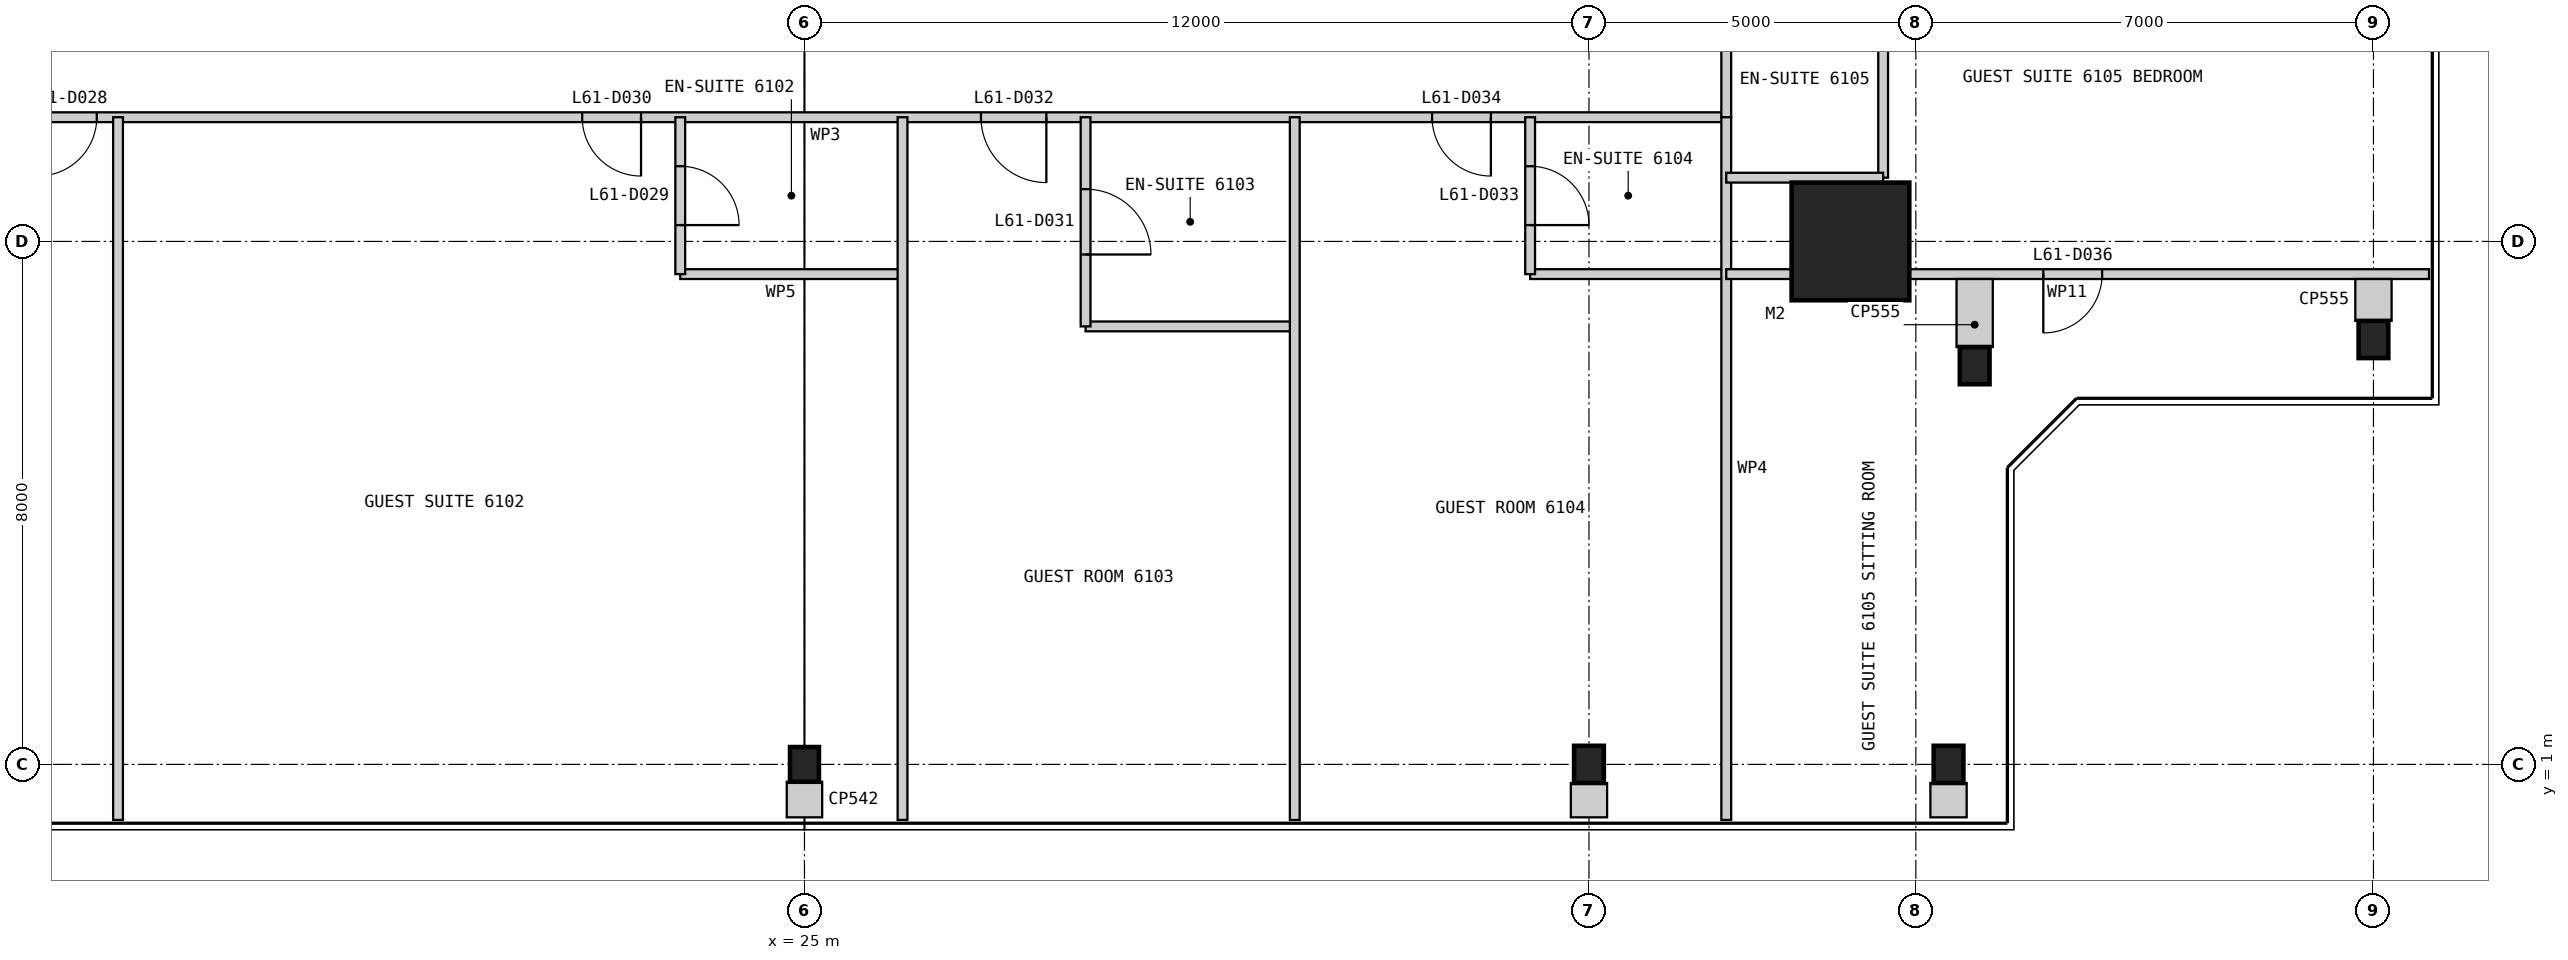
"""IFC4 building model, lengths in metres.
Left out: names, types, materials, properties, quantities, classifications, styles, units other than length and angle.
Written with IfcOpenShell. Run it as: python <this file> out.ifc"""

import sys

from ifc_helpers import new_model, si_unit, direction, frame, frame_2d, origin, origin_2d, place, context, subcontext, project, spatial, rectangle, i_section, extrude, element, fill, save


model = new_model("IFC4")
c1 = context("Model", 3, precision=1e-05, world=origin(), true_north=direction((0.0, 1.0)))
c2 = subcontext(c1, "Body", "Model", "MODEL_VIEW")
j1 = project(units=[si_unit("LENGTHUNIT", "METRE"), si_unit("PLANEANGLEUNIT", "RADIAN")], contexts=[c1])
p1 = place(None, origin())
s1 = spatial("IfcSite", under=j1, at=p1, CompositionType="ELEMENT")
p2 = place(p1, origin())
s2 = spatial("IfcBuilding", under=s1, at=p2, CompositionType="ELEMENT")
p3 = place(p2, frame((0.0, 0.0, 259.4)))
s3 = spatial("IfcBuildingStorey", under=s2, at=p3, CompositionType="ELEMENT", Elevation=259.4)
p4 = place(p3, frame((41.0, 9.0, 0.0), z_axis=(0.0, 0.0, 1.0), x_axis=(1.0, 0.0, 0.0)))
e1 = element("IfcColumn", 1, at=p4, inside=s3, PredefinedType="COLUMN", context=c2, shape_type="SweptSolid", body=[
    extrude(rectangle(XDim=1.8, YDim=1.8, at=origin_2d()), origin(), (0.0, 0.0, 1.0), 3.4),
])
p5 = place(p3, frame((25.0, 1.0, 0.0), z_axis=(0.0, 0.0, 1.0), x_axis=(1.0, 0.0, 0.0)))
e2 = element("IfcColumn", 2, at=p5, inside=s3, PredefinedType="COLUMN", context=c2, shape_type="SweptSolid", body=[
    extrude(i_section(OverallWidth=0.442, OverallDepth=0.531, WebThickness=0.066, FlangeThickness=0.106, at=origin_2d()), origin(), (0.0, 0.0, 1.0), 3.4),
])
for number, where, z_axis, x_axis in (
    (3, (37.0, 1.0, 0.0), (0.0, 0.0, 1.0), (1.0, 0.0, 0.0)),
    (4, (42.5, 1.0, 0.0), (0.0, 0.0, 1.0), (1.0, 0.0, 0.0)),
    (5, (42.9, 7.1, 0.0), (0.0, 0.0, 1.0), (1.0, 0.0, 0.0)),
    (6, (49.0, 7.5, 0.0), (0.0, 0.0, 1.0), (1.0, 0.0, 0.0)),
):
    element("IfcColumn", number, at=place(p3, frame(where, z_axis=z_axis, x_axis=x_axis)), inside=s3, PredefinedType="COLUMN", context=c2, shape_type="SweptSolid", body=[
        extrude(i_section(OverallWidth=0.455, OverallDepth=0.569, WebThickness=0.078, FlangeThickness=0.125, at=origin_2d()), origin(), (0.0, 0.0, 1.0), 3.4),
    ])
p6 = place(p3, frame((10.9, 10.9, 0.0), z_axis=(0.0, 0.0, 1.0), x_axis=(1.0, 0.0, 0.0)))
e7 = element("IfcWall", 7, at=p6, inside=s3, PredefinedType="PARTITIONING", context=c2, shape_type="SweptSolid", body=[
    extrude(rectangle(XDim=28.2, YDim=0.15, at=frame_2d((14.1, 0.0))), origin(), (0.0, 0.0, 1.0), 3.25),
])
p7 = place(p6, frame((2.375, 0.0, 0.0)))
e8 = element("IfcOpeningElement", 8, at=p7, cuts=e7, PredefinedType="OPENING", context=c2, shape_type="SweptSolid", body=[
    extrude(rectangle(XDim=0.9, YDim=2.1, at=frame_2d((0.45, 1.05))), frame((0.0, 0.085, 0.0), z_axis=(0.0, -1.0, 0.0), x_axis=(1.0, 0.0, 0.0)), (0.0, 0.0, 1.0), 0.17),
])
p8 = place(p6, frame((10.7, 0.0, 0.0)))
e9 = element("IfcOpeningElement", 9, at=p8, cuts=e7, PredefinedType="OPENING", context=c2, shape_type="SweptSolid", body=[
    extrude(rectangle(XDim=0.9, YDim=2.1, at=frame_2d((0.45, 1.05))), frame((0.0, 0.085, 0.0), z_axis=(0.0, -1.0, 0.0), x_axis=(1.0, 0.0, 0.0)), (0.0, 0.0, 1.0), 0.17),
])
p9 = place(p6, frame((16.8, 0.0, 0.0)))
e10 = element("IfcOpeningElement", 10, at=p9, cuts=e7, PredefinedType="OPENING", context=c2, shape_type="SweptSolid", body=[
    extrude(rectangle(XDim=1.0, YDim=2.1, at=frame_2d((0.5, 1.05))), frame((0.0, 0.085, 0.0), z_axis=(0.0, -1.0, 0.0), x_axis=(1.0, 0.0, 0.0)), (0.0, 0.0, 1.0), 0.17),
])
p10 = place(p6, frame((23.7, 0.0, 0.0)))
e11 = element("IfcOpeningElement", 11, at=p10, cuts=e7, PredefinedType="OPENING", context=c2, shape_type="SweptSolid", body=[
    extrude(rectangle(XDim=0.9, YDim=2.1, at=frame_2d((0.45, 1.05))), frame((0.0, 0.085, 0.0), z_axis=(0.0, -1.0, 0.0), x_axis=(1.0, 0.0, 0.0)), (0.0, 0.0, 1.0), 0.17),
])
p11 = place(p3, frame((14.5, 0.15, 0.0), z_axis=(0.0, 0.0, 1.0), x_axis=(0.0, 1.0, 0.0)))
e12 = element("IfcWall", 12, at=p11, inside=s3, PredefinedType="PARTITIONING", context=c2, shape_type="SweptSolid", body=[
    extrude(rectangle(XDim=10.75, YDim=0.15, at=frame_2d((5.375, 0.0))), origin(), (0.0, 0.0, 1.0), 3.25),
])
p12 = place(p3, frame((23.1, 8.5, 0.0), z_axis=(0.0, 0.0, 1.0), x_axis=(1.0, 0.0, 0.0)))
e13 = element("IfcWall", 13, at=p12, inside=s3, PredefinedType="PARTITIONING", context=c2, shape_type="SweptSolid", body=[
    extrude(rectangle(XDim=3.4, YDim=0.15, at=frame_2d((1.7, 0.0))), origin(), (0.0, 0.0, 1.0), 3.25),
])
p13 = place(p3, frame((23.1, 8.5, 0.0), z_axis=(0.0, 0.0, 1.0), x_axis=(0.0, 1.0, 0.0)))
e14 = element("IfcWall", 14, at=p13, inside=s3, PredefinedType="PARTITIONING", context=c2, shape_type="SweptSolid", body=[
    extrude(rectangle(XDim=2.4, YDim=0.15, at=frame_2d((1.2, 0.0))), origin(), (0.0, 0.0, 1.0), 3.25),
])
p14 = place(p13, frame((0.75, 0.0, 0.0)))
e15 = element("IfcOpeningElement", 15, at=p14, cuts=e14, PredefinedType="OPENING", context=c2, shape_type="SweptSolid", body=[
    extrude(rectangle(XDim=0.9, YDim=2.1, at=frame_2d((0.45, 1.05))), frame((0.0, 0.085, 0.0), z_axis=(0.0, -1.0, 0.0), x_axis=(1.0, 0.0, 0.0)), (0.0, 0.0, 1.0), 0.17),
])
p15 = place(p3, frame((26.5, 0.15, 0.0), z_axis=(0.0, 0.0, 1.0), x_axis=(0.0, 1.0, 0.0)))
e16 = element("IfcWall", 16, at=p15, inside=s3, PredefinedType="PARTITIONING", context=c2, shape_type="SweptSolid", body=[
    extrude(rectangle(XDim=10.75, YDim=0.15, at=frame_2d((5.375, 0.0))), origin(), (0.0, 0.0, 1.0), 3.25),
])
p16 = place(p3, frame((29.3, 7.7, 0.0), z_axis=(0.0, 0.0, 1.0), x_axis=(1.0, 0.0, 0.0)))
e17 = element("IfcWall", 17, at=p16, inside=s3, PredefinedType="PARTITIONING", context=c2, shape_type="SweptSolid", body=[
    extrude(rectangle(XDim=3.2, YDim=0.15, at=frame_2d((1.6, 0.0))), origin(), (0.0, 0.0, 1.0), 3.25),
])
p17 = place(p3, frame((29.3, 7.7, 0.0), z_axis=(0.0, 0.0, 1.0), x_axis=(0.0, 1.0, 0.0)))
e18 = element("IfcWall", 18, at=p17, inside=s3, PredefinedType="PARTITIONING", context=c2, shape_type="SweptSolid", body=[
    extrude(rectangle(XDim=3.2, YDim=0.15, at=frame_2d((1.6, 0.0))), origin(), (0.0, 0.0, 1.0), 3.25),
])
p18 = place(p17, frame((1.1, 0.0, 0.0)))
e19 = element("IfcOpeningElement", 19, at=p18, cuts=e18, PredefinedType="OPENING", context=c2, shape_type="SweptSolid", body=[
    extrude(rectangle(XDim=1.0, YDim=2.1, at=frame_2d((0.5, 1.05))), frame((0.0, 0.085, 0.0), z_axis=(0.0, -1.0, 0.0), x_axis=(1.0, 0.0, 0.0)), (0.0, 0.0, 1.0), 0.17),
])
p19 = place(p3, frame((32.5, 0.15, 0.0), z_axis=(0.0, 0.0, 1.0), x_axis=(0.0, 1.0, 0.0)))
e20 = element("IfcWall", 20, at=p19, inside=s3, PredefinedType="PARTITIONING", context=c2, shape_type="SweptSolid", body=[
    extrude(rectangle(XDim=10.75, YDim=0.15, at=frame_2d((5.375, 0.0))), origin(), (0.0, 0.0, 1.0), 3.25),
])
p20 = place(p3, frame((36.1, 8.5, 0.0), z_axis=(0.0, 0.0, 1.0), x_axis=(1.0, 0.0, 0.0)))
e21 = element("IfcWall", 21, at=p20, inside=s3, PredefinedType="PARTITIONING", context=c2, shape_type="SweptSolid", body=[
    extrude(rectangle(XDim=3.0, YDim=0.15, at=frame_2d((1.5, 0.0))), origin(), (0.0, 0.0, 1.0), 3.25),
])
p21 = place(p3, frame((36.1, 8.5, 0.0), z_axis=(0.0, 0.0, 1.0), x_axis=(0.0, 1.0, 0.0)))
e22 = element("IfcWall", 22, at=p21, inside=s3, PredefinedType="PARTITIONING", context=c2, shape_type="SweptSolid", body=[
    extrude(rectangle(XDim=2.4, YDim=0.15, at=frame_2d((1.2, 0.0))), origin(), (0.0, 0.0, 1.0), 3.25),
])
p22 = place(p21, frame((0.75, 0.0, 0.0)))
e23 = element("IfcOpeningElement", 23, at=p22, cuts=e22, PredefinedType="OPENING", context=c2, shape_type="SweptSolid", body=[
    extrude(rectangle(XDim=0.9, YDim=2.1, at=frame_2d((0.45, 1.05))), frame((0.0, 0.085, 0.0), z_axis=(0.0, -1.0, 0.0), x_axis=(1.0, 0.0, 0.0)), (0.0, 0.0, 1.0), 0.17),
])
p23 = place(p3, frame((39.1, 10.9, 0.0), z_axis=(0.0, 0.0, 1.0), x_axis=(0.0, 1.0, 0.0)))
e24 = element("IfcWall", 24, at=p23, inside=s3, PredefinedType="PARTITIONING", context=c2, shape_type="SweptSolid", body=[
    extrude(rectangle(XDim=28.2, YDim=0.15, at=frame_2d((14.1, 0.0))), origin(), (0.0, 0.0, 1.0), 3.25),
])
p24 = place(p23, frame((2.375, 0.0, 0.0)))
e25 = element("IfcOpeningElement", 25, at=p24, cuts=e24, PredefinedType="OPENING", context=c2, shape_type="SweptSolid", body=[
    extrude(rectangle(XDim=0.9, YDim=2.1, at=frame_2d((0.45, 1.05))), frame((0.0, 0.085, 0.0), z_axis=(0.0, -1.0, 0.0), x_axis=(1.0, 0.0, 0.0)), (0.0, 0.0, 1.0), 0.17),
])
p25 = place(p23, frame((10.7, 0.0, 0.0)))
e26 = element("IfcOpeningElement", 26, at=p25, cuts=e24, PredefinedType="OPENING", context=c2, shape_type="SweptSolid", body=[
    extrude(rectangle(XDim=0.9, YDim=2.1, at=frame_2d((0.45, 1.05))), frame((0.0, 0.085, 0.0), z_axis=(0.0, -1.0, 0.0), x_axis=(1.0, 0.0, 0.0)), (0.0, 0.0, 1.0), 0.17),
])
p26 = place(p23, frame((17.1, 0.0, 0.0)))
e27 = element("IfcOpeningElement", 27, at=p26, cuts=e24, PredefinedType="OPENING", context=c2, shape_type="SweptSolid", body=[
    extrude(rectangle(XDim=0.9, YDim=2.1, at=frame_2d((0.45, 1.05))), frame((0.0, 0.085, 0.0), z_axis=(0.0, -1.0, 0.0), x_axis=(1.0, 0.0, 0.0)), (0.0, 0.0, 1.0), 0.17),
])
p27 = place(p23, frame((23.7, 0.0, 0.0)))
e28 = element("IfcOpeningElement", 28, at=p27, cuts=e24, PredefinedType="OPENING", context=c2, shape_type="SweptSolid", body=[
    extrude(rectangle(XDim=0.9, YDim=2.1, at=frame_2d((0.45, 1.05))), frame((0.0, 0.085, 0.0), z_axis=(0.0, -1.0, 0.0), x_axis=(1.0, 0.0, 0.0)), (0.0, 0.0, 1.0), 0.17),
])
p28 = place(p3, frame((39.1, 0.15, 0.0), z_axis=(0.0, 0.0, 1.0), x_axis=(0.0, 1.0, 0.0)))
e29 = element("IfcWall", 29, at=p28, inside=s3, PredefinedType="PARTITIONING", context=c2, shape_type="SweptSolid", body=[
    extrude(rectangle(XDim=10.75, YDim=0.15, at=frame_2d((5.375, 0.0))), origin(), (0.0, 0.0, 1.0), 3.25),
])
p29 = place(p3, frame((41.5, 9.975, 0.0), z_axis=(0.0, 0.0, 1.0), x_axis=(0.0, 1.0, 0.0)))
e30 = element("IfcWall", 30, at=p29, inside=s3, PredefinedType="PARTITIONING", context=c2, shape_type="SweptSolid", body=[
    extrude(rectangle(XDim=3.0, YDim=0.15, at=frame_2d((1.5, 0.0))), origin(), (0.0, 0.0, 1.0), 3.25),
])
p30 = place(p3, frame((41.5, 9.975, 0.0), z_axis=(0.0, 0.0, 1.0), x_axis=(-1.0, 0.0, 0.0)))
e31 = element("IfcWall", 31, at=p30, inside=s3, PredefinedType="PARTITIONING", context=c2, shape_type="SweptSolid", body=[
    extrude(rectangle(XDim=2.4, YDim=0.15, at=frame_2d((1.2, 0.0))), origin(), (0.0, 0.0, 1.0), 3.25),
])
p31 = place(p3, frame((49.85, 8.5, 0.0), z_axis=(0.0, 0.0, 1.0), x_axis=(-1.0, 0.0, 0.0)))
e32 = element("IfcWall", 32, at=p31, inside=s3, PredefinedType="PARTITIONING", context=c2, shape_type="SweptSolid", body=[
    extrude(rectangle(XDim=10.75, YDim=0.15, at=frame_2d((5.375, 0.0))), origin(), (0.0, 0.0, 1.0), 3.25),
])
p32 = place(p31, frame((5.0, 0.0, 0.0)))
e33 = element("IfcOpeningElement", 33, at=p32, cuts=e32, PredefinedType="OPENING", context=c2, shape_type="SweptSolid", body=[
    extrude(rectangle(XDim=0.9, YDim=2.1, at=frame_2d((0.45, 1.05))), frame((0.0, 0.085, 0.0), z_axis=(0.0, -1.0, 0.0), x_axis=(1.0, 0.0, 0.0)), (0.0, 0.0, 1.0), 0.17),
])
p33 = place(p3, frame((25.0, 0.19, 0.0), z_axis=(0.0, 0.0, 1.0), x_axis=(0.0, 1.0, 0.0)))
e34 = element("IfcWall", 34, at=p33, inside=s3, PredefinedType="PARTITIONING", context=c2, shape_type="SweptSolid", body=[
    extrude(rectangle(XDim=0.545, YDim=0.542, at=frame_2d((0.272, 0.0))), origin(), (0.0, 0.0, 1.0), 3.25),
])
for number, where, z_axis, x_axis in (
    (35, (37.0, 0.19, 0.0), (0.0, 0.0, 1.0), (0.0, 1.0, 0.0)),
    (36, (42.5, 0.19, 0.0), (0.0, 0.0, 1.0), (0.0, 1.0, 0.0)),
):
    element("IfcWall", number, at=place(p3, frame(where, z_axis=z_axis, x_axis=x_axis)), inside=s3, PredefinedType="PARTITIONING", context=c2, shape_type="SweptSolid", body=[
        extrude(rectangle(XDim=0.526, YDim=0.555, at=frame_2d((0.263, 0.0))), origin(), (0.0, 0.0, 1.0), 3.25),
    ])
p34 = place(p3, frame((42.9, 8.425, 0.0), z_axis=(0.0, 0.0, 1.0), x_axis=(0.0, -1.0, 0.0)))
e37 = element("IfcWall", 37, at=p34, inside=s3, PredefinedType="PARTITIONING", context=c2, shape_type="SweptSolid", body=[
    extrude(rectangle(XDim=1.041, YDim=0.555, at=frame_2d((0.52, 0.0))), origin(), (0.0, 0.0, 1.0), 3.25),
])
p35 = place(p3, frame((49.0, 8.425, 0.0), z_axis=(0.0, 0.0, 1.0), x_axis=(0.0, -1.0, 0.0)))
e38 = element("IfcWall", 38, at=p35, inside=s3, PredefinedType="PARTITIONING", context=c2, shape_type="SweptSolid", body=[
    extrude(rectangle(XDim=0.641, YDim=0.555, at=frame_2d((0.32, 0.0))), origin(), (0.0, 0.0, 1.0), 2.338),
])
p36 = place(p7, frame((0.9, 0.0, 0.0), z_axis=(0.0, 0.0, 1.0), x_axis=(-1.0, 0.0, 0.0)))
e39 = element("IfcDoor", 39, at=p36, inside=s3, OperationType="SINGLE_SWING_RIGHT", PredefinedType="DOOR", context=c2, shape_type="SweptSolid", body=[
    extrude(rectangle(XDim=0.9, YDim=2.1, at=frame_2d((0.45, 1.05))), frame((0.0, 0.025, 0.0), z_axis=(0.0, -1.0, 0.0), x_axis=(1.0, 0.0, 0.0)), (0.0, 0.0, 1.0), 0.05),
])
fill(e8, e39)
p37 = place(p14, frame((0.9, 0.0, 0.0), z_axis=(0.0, 0.0, 1.0), x_axis=(-1.0, 0.0, 0.0)))
e40 = element("IfcDoor", 40, at=p37, inside=s3, OperationType="SINGLE_SWING_RIGHT", PredefinedType="DOOR", context=c2, shape_type="SweptSolid", body=[
    extrude(rectangle(XDim=0.9, YDim=2.1, at=frame_2d((0.45, 1.05))), frame((0.0, 0.025, 0.0), z_axis=(0.0, -1.0, 0.0), x_axis=(1.0, 0.0, 0.0)), (0.0, 0.0, 1.0), 0.05),
])
fill(e15, e40)
p38 = place(p8, frame((0.9, 0.0, 0.0), z_axis=(0.0, 0.0, 1.0), x_axis=(-1.0, 0.0, 0.0)))
e41 = element("IfcDoor", 41, at=p38, inside=s3, OperationType="SINGLE_SWING_LEFT", PredefinedType="DOOR", context=c2, shape_type="SweptSolid", body=[
    extrude(rectangle(XDim=0.9, YDim=2.1, at=frame_2d((0.45, 1.05))), frame((0.0, 0.025, 0.0), z_axis=(0.0, -1.0, 0.0), x_axis=(1.0, 0.0, 0.0)), (0.0, 0.0, 1.0), 0.05),
])
fill(e9, e41)
p39 = place(p18, frame((1.0, 0.0, 0.0), z_axis=(0.0, 0.0, 1.0), x_axis=(-1.0, 0.0, 0.0)))
e42 = element("IfcDoor", 42, at=p39, inside=s3, OperationType="SINGLE_SWING_RIGHT", PredefinedType="DOOR", context=c2, shape_type="SweptSolid", body=[
    extrude(rectangle(XDim=1.0, YDim=2.1, at=frame_2d((0.5, 1.05))), frame((0.0, 0.025, 0.0), z_axis=(0.0, -1.0, 0.0), x_axis=(1.0, 0.0, 0.0)), (0.0, 0.0, 1.0), 0.05),
])
fill(e19, e42)
p40 = place(p9, frame((1.0, 0.0, 0.0), z_axis=(0.0, 0.0, 1.0), x_axis=(-1.0, 0.0, 0.0)))
e43 = element("IfcDoor", 43, at=p40, inside=s3, OperationType="SINGLE_SWING_LEFT", PredefinedType="DOOR", context=c2, shape_type="SweptSolid", body=[
    extrude(rectangle(XDim=1.0, YDim=2.1, at=frame_2d((0.5, 1.05))), frame((0.0, 0.025, 0.0), z_axis=(0.0, -1.0, 0.0), x_axis=(1.0, 0.0, 0.0)), (0.0, 0.0, 1.0), 0.05),
])
fill(e10, e43)
p41 = place(p22, frame((0.9, 0.0, 0.0), z_axis=(0.0, 0.0, 1.0), x_axis=(-1.0, 0.0, 0.0)))
e44 = element("IfcDoor", 44, at=p41, inside=s3, OperationType="SINGLE_SWING_RIGHT", PredefinedType="DOOR", context=c2, shape_type="SweptSolid", body=[
    extrude(rectangle(XDim=0.9, YDim=2.1, at=frame_2d((0.45, 1.05))), frame((0.0, 0.025, 0.0), z_axis=(0.0, -1.0, 0.0), x_axis=(1.0, 0.0, 0.0)), (0.0, 0.0, 1.0), 0.05),
])
fill(e23, e44)
p42 = place(p10, frame((0.9, 0.0, 0.0), z_axis=(0.0, 0.0, 1.0), x_axis=(-1.0, 0.0, 0.0)))
e45 = element("IfcDoor", 45, at=p42, inside=s3, OperationType="SINGLE_SWING_LEFT", PredefinedType="DOOR", context=c2, shape_type="SweptSolid", body=[
    extrude(rectangle(XDim=0.9, YDim=2.1, at=frame_2d((0.45, 1.05))), frame((0.0, 0.025, 0.0), z_axis=(0.0, -1.0, 0.0), x_axis=(1.0, 0.0, 0.0)), (0.0, 0.0, 1.0), 0.05),
])
fill(e11, e45)
p43 = place(p32, origin())
e46 = element("IfcDoor", 46, at=p43, inside=s3, OperationType="SINGLE_SWING_RIGHT", PredefinedType="DOOR", context=c2, shape_type="SweptSolid", body=[
    extrude(rectangle(XDim=0.9, YDim=2.1, at=frame_2d((0.45, 1.05))), frame((0.0, 0.025, 0.0), z_axis=(0.0, -1.0, 0.0), x_axis=(1.0, 0.0, 0.0)), (0.0, 0.0, 1.0), 0.05),
])
fill(e33, e46)
save(model, sys.argv[1])
